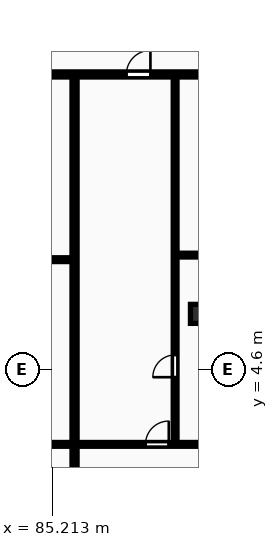
"""IFC4 building model, lengths in metres.
Left out: names, types, materials, properties, quantities, classifications, styles, units other than length and angle.
Written with IfcOpenShell. Run it as: python <this file> out.ifc"""

import sys

from ifc_helpers import new_model, si_unit, direction, frame, frame_2d, origin, origin_2d, place, context, subcontext, project, spatial, rectangle, extrude, element, fill, save


model = new_model("IFC4")
c1 = context("Model", 3, precision=1e-05, world=origin(), true_north=direction((0.0, 1.0)))
c2 = subcontext(c1, "Body", "Model", "MODEL_VIEW")
j1 = project(units=[si_unit("LENGTHUNIT", "METRE"), si_unit("PLANEANGLEUNIT", "RADIAN")], contexts=[c1])
p1 = place(None, origin())
s1 = spatial("IfcSite", under=j1, at=p1, CompositionType="ELEMENT")
p2 = place(p1, origin())
s2 = spatial("IfcBuilding", under=s1, at=p2, CompositionType="ELEMENT")
p3 = place(p2, frame((0.0, 0.0, 80.8)))
s3 = spatial("IfcBuildingStorey", under=s2, at=p3, CompositionType="ELEMENT", Elevation=80.8)
p4 = place(p3, frame((91.1, 6.8, 0.0), z_axis=(0.0, 0.0, 1.0), x_axis=(1.0, 0.0, 0.0)))
e1 = element("IfcColumn", 1, at=p4, inside=s3, PredefinedType="COLUMN", context=c2, shape_type="SweptSolid", body=[
    extrude(rectangle(XDim=0.85, YDim=0.75, at=origin_2d()), origin(), (0.0, 0.0, 1.0), 3.25),
])
p5 = place(p3, frame((86.1, -8.7, 0.0), z_axis=(0.0, 0.0, 1.0), x_axis=(0.0, 1.0, 0.0)))
e2 = element("IfcWall", 2, at=p5, inside=s3, PredefinedType="PARTITIONING", context=c2, shape_type="SweptSolid", body=[
    extrude(rectangle(XDim=24.87, YDim=0.2, at=frame_2d((12.435, 0.0))), origin(), (0.0, 0.0, 1.0), 2.97),
])
p6 = place(p3, frame((76.73, 8.94, 0.0), z_axis=(0.0, 0.0, 1.0), x_axis=(1.0, 0.0, 0.0)))
e3 = element("IfcWall", 3, at=p6, inside=s3, PredefinedType="PARTITIONING", context=c2, shape_type="SweptSolid", body=[
    extrude(rectangle(XDim=9.29, YDim=0.15, at=frame_2d((4.645, 0.0))), origin(), (0.0, 0.0, 1.0), 2.97),
])
p7 = place(p6, frame((2.854, 0.0, 0.0)))
e4 = element("IfcOpeningElement", 4, at=p7, cuts=e3, PredefinedType="OPENING", context=c2, shape_type="SweptSolid", body=[
    extrude(rectangle(XDim=0.88, YDim=2.06, at=frame_2d((0.44, 1.03))), frame((0.0, 0.085, 0.0), z_axis=(0.0, -1.0, 0.0), x_axis=(1.0, 0.0, 0.0)), (0.0, 0.0, 1.0), 0.17),
])
p8 = place(p3, frame((72.78, 1.65, 0.0), z_axis=(0.0, 0.0, 1.0), x_axis=(1.0, 0.0, 0.0)))
e5 = element("IfcWall", 5, at=p8, inside=s3, PredefinedType="PARTITIONING", context=c2, shape_type="SweptSolid", body=[
    extrude(rectangle(XDim=13.24, YDim=0.15, at=frame_2d((6.62, 0.0))), origin(), (0.0, 0.0, 1.0), 2.97),
])
p9 = place(p8, frame((2.72, 0.0, 0.0)))
e6 = element("IfcOpeningElement", 6, at=p9, cuts=e5, PredefinedType="OPENING", context=c2, shape_type="SweptSolid", body=[
    extrude(rectangle(XDim=0.92, YDim=2.08, at=frame_2d((0.46, 1.04))), frame((0.0, 0.085, 0.0), z_axis=(0.0, -1.0, 0.0), x_axis=(1.0, 0.0, 0.0)), (0.0, 0.0, 1.0), 0.17),
])
p10 = place(p3, frame((90.13, 9.12, 0.0), z_axis=(0.0, 0.0, 1.0), x_axis=(1.0, 0.0, 0.0)))
e7 = element("IfcWall", 7, at=p10, inside=s3, PredefinedType="PARTITIONING", context=c2, shape_type="SweptSolid", body=[
    extrude(rectangle(XDim=13.69, YDim=0.15, at=frame_2d((6.845, 0.0))), origin(), (0.0, 0.0, 1.0), 2.97),
])
p11 = place(p10, frame((5.625, 0.0, 0.0)))
e8 = element("IfcOpeningElement", 8, at=p11, cuts=e7, PredefinedType="OPENING", context=c2, shape_type="SweptSolid", body=[
    extrude(rectangle(XDim=0.88, YDim=2.06, at=frame_2d((0.44, 1.03))), frame((0.0, 0.085, 0.0), z_axis=(0.0, -1.0, 0.0), x_axis=(1.0, 0.0, 0.0)), (0.0, 0.0, 1.0), 0.17),
])
p12 = place(p3, frame((90.07, 1.69, 0.0), z_axis=(0.0, 0.0, 1.0), x_axis=(0.0, 1.0, 0.0)))
e9 = element("IfcWall", 9, at=p12, inside=s3, PredefinedType="PARTITIONING", context=c2, shape_type="SweptSolid", body=[
    extrude(rectangle(XDim=14.5, YDim=0.15, at=frame_2d((7.25, 0.0))), origin(), (0.0, 0.0, 1.0), 2.97),
])
p13 = place(p12, frame((2.611, 0.0, 0.0)))
e10 = element("IfcOpeningElement", 10, at=p13, cuts=e9, PredefinedType="OPENING", context=c2, shape_type="SweptSolid", body=[
    extrude(rectangle(XDim=0.88, YDim=2.06, at=frame_2d((0.44, 1.03))), frame((0.0, 0.085, 0.0), z_axis=(0.0, -1.0, 0.0), x_axis=(1.0, 0.0, 0.0)), (0.0, 0.0, 1.0), 0.17),
])
p14 = place(p3, frame((86.18, 1.65, 0.0), z_axis=(0.0, 0.0, 1.0), x_axis=(1.0, 0.0, 0.0)))
e11 = element("IfcWall", 11, at=p14, inside=s3, PredefinedType="PARTITIONING", context=c2, shape_type="SweptSolid", body=[
    extrude(rectangle(XDim=17.64, YDim=0.15, at=frame_2d((8.82, 0.0))), origin(), (0.0, 0.0, 1.0), 2.97),
])
p15 = place(p14, frame((2.72, 0.0, 0.0)))
e12 = element("IfcOpeningElement", 12, at=p15, cuts=e11, PredefinedType="OPENING", context=c2, shape_type="SweptSolid", body=[
    extrude(rectangle(XDim=0.92, YDim=2.08, at=frame_2d((0.46, 1.04))), frame((0.0, 0.085, 0.0), z_axis=(0.0, -1.0, 0.0), x_axis=(1.0, 0.0, 0.0)), (0.0, 0.0, 1.0), 0.17),
])
p16 = place(p3, frame((72.7, 16.25, 0.0), z_axis=(0.0, 0.0, 1.0), x_axis=(1.0, 0.0, 0.0)))
e13 = element("IfcWall", 13, at=p16, inside=s3, PredefinedType="PARTITIONING", context=c2, shape_type="SweptSolid", body=[
    extrude(rectangle(XDim=58.0, YDim=0.2, at=frame_2d((29.0, 0.0))), origin(), (0.0, 0.0, 1.0), 2.97),
])
p17 = place(p16, frame((2.77, 0.0, 0.0)))
e14 = element("IfcOpeningElement", 14, at=p17, cuts=e13, PredefinedType="OPENING", context=c2, shape_type="SweptSolid", body=[
    extrude(rectangle(XDim=0.95, YDim=2.15, at=frame_2d((0.475, 1.075))), frame((0.0, 0.11, 0.0), z_axis=(0.0, -1.0, 0.0), x_axis=(1.0, 0.0, 0.0)), (0.0, 0.0, 1.0), 0.22),
])
p18 = place(p16, frame((15.445, 0.0, 0.0)))
e15 = element("IfcOpeningElement", 15, at=p18, cuts=e13, PredefinedType="OPENING", context=c2, shape_type="SweptSolid", body=[
    extrude(rectangle(XDim=0.95, YDim=2.15, at=frame_2d((0.475, 1.075))), frame((0.0, 0.11, 0.0), z_axis=(0.0, -1.0, 0.0), x_axis=(1.0, 0.0, 0.0)), (0.0, 0.0, 1.0), 0.22),
])
p19 = place(p16, frame((33.245, 0.0, 0.0)))
e16 = element("IfcOpeningElement", 16, at=p19, cuts=e13, PredefinedType="OPENING", context=c2, shape_type="SweptSolid", body=[
    extrude(rectangle(XDim=0.95, YDim=2.15, at=frame_2d((0.475, 1.075))), frame((0.0, 0.11, 0.0), z_axis=(0.0, -1.0, 0.0), x_axis=(1.0, 0.0, 0.0)), (0.0, 0.0, 1.0), 0.22),
])
p20 = place(p16, frame((47.645, 0.0, 0.0)))
e17 = element("IfcOpeningElement", 17, at=p20, cuts=e13, PredefinedType="OPENING", context=c2, shape_type="SweptSolid", body=[
    extrude(rectangle(XDim=0.95, YDim=2.15, at=frame_2d((0.475, 1.075))), frame((0.0, 0.11, 0.0), z_axis=(0.0, -1.0, 0.0), x_axis=(1.0, 0.0, 0.0)), (0.0, 0.0, 1.0), 0.22),
])
p21 = place(p13, origin())
e18 = element("IfcDoor", 18, at=p21, inside=s3, OperationType="SINGLE_SWING_LEFT", PredefinedType="DOOR", context=c2, shape_type="SweptSolid", body=[
    extrude(rectangle(XDim=0.88, YDim=2.06, at=frame_2d((0.44, 1.03))), frame((0.0, 0.025, 0.0), z_axis=(0.0, -1.0, 0.0), x_axis=(1.0, 0.0, 0.0)), (0.0, 0.0, 1.0), 0.05),
])
fill(e10, e18)
p22 = place(p15, origin())
e19 = element("IfcDoor", 19, at=p22, inside=s3, OperationType="SINGLE_SWING_RIGHT", PredefinedType="DOOR", context=c2, shape_type="SweptSolid", body=[
    extrude(rectangle(XDim=0.92, YDim=2.08, at=frame_2d((0.46, 1.04))), frame((0.0, 0.025, 0.0), z_axis=(0.0, -1.0, 0.0), x_axis=(1.0, 0.0, 0.0)), (0.0, 0.0, 1.0), 0.05),
])
fill(e12, e19)
p23 = place(p18, origin())
e20 = element("IfcDoor", 20, at=p23, inside=s3, OperationType="SINGLE_SWING_RIGHT", PredefinedType="DOOR", context=c2, shape_type="SweptSolid", body=[
    extrude(rectangle(XDim=0.95, YDim=2.15, at=frame_2d((0.475, 1.075))), frame((0.0, 0.025, 0.0), z_axis=(0.0, -1.0, 0.0), x_axis=(1.0, 0.0, 0.0)), (0.0, 0.0, 1.0), 0.05),
])
fill(e15, e20)
save(model, sys.argv[1])
